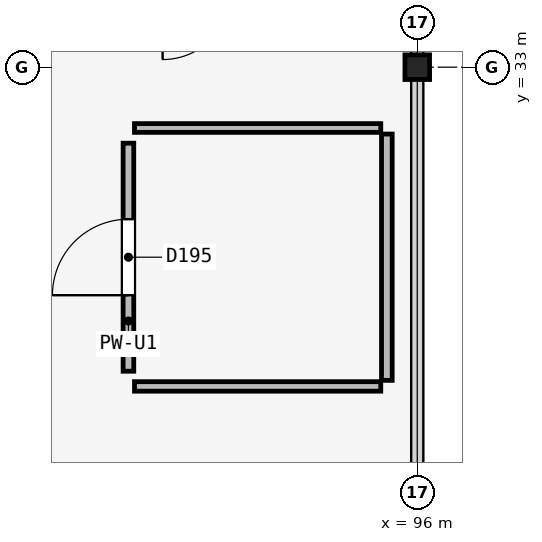
"""IFC4 building model, lengths in metres.
Left out: names, types, materials, properties, quantities, classifications, styles, units other than length and angle.
Written with IfcOpenShell. Run it as: python <this file> out.ifc"""

import sys

from ifc_helpers import new_model, si_unit, direction, frame, frame_2d, origin, origin_2d, place, context, subcontext, project, spatial, rectangle, hollow_circle, extrude, element, fill, save


model = new_model("IFC4")
c1 = context("Model", 3, precision=1e-05, world=origin(), true_north=direction((0.0, 1.0)))
c2 = subcontext(c1, "Body", "Model", "MODEL_VIEW")
j1 = project(units=[si_unit("LENGTHUNIT", "METRE"), si_unit("PLANEANGLEUNIT", "RADIAN")], contexts=[c1])
p1 = place(None, origin())
s1 = spatial("IfcSite", under=j1, at=p1, CompositionType="ELEMENT")
p2 = place(p1, origin())
s2 = spatial("IfcBuilding", under=s1, at=p2, CompositionType="ELEMENT")
p3 = place(p2, frame((0.0, 0.0, 4.8)))
s3 = spatial("IfcBuildingStorey", under=s2, at=p3, CompositionType="ELEMENT", Elevation=4.8)
p4 = place(p3, frame((96.0, 33.0, 0.0), z_axis=(0.0, 0.0, 1.0), x_axis=(1.0, 0.0, 0.0)))
e1 = element("IfcColumn", 1, at=p4, inside=s3, PredefinedType="COLUMN", context=c2, shape_type="SweptSolid", body=[
    extrude(hollow_circle(Radius=0.162, WallThickness=0.013, at=origin_2d()), origin(), (0.0, 0.0, 1.0), 4.5),
])
p5 = place(p3, frame((92.2, 29.0, 0.0), z_axis=(0.0, 0.0, 1.0), x_axis=(0.0, 1.0, 0.0)))
e2 = element("IfcWall", 2, at=p5, inside=s3, PredefinedType="PARTITIONING", context=c2, shape_type="SweptSolid", body=[
    extrude(rectangle(XDim=3.0, YDim=0.14, at=frame_2d((1.5, 0.0))), origin(), (0.0, 0.0, 1.0), 4.19),
])
p6 = place(p5, frame((1.0, 0.0, 0.0)))
e3 = element("IfcOpeningElement", 3, at=p6, cuts=e2, PredefinedType="OPENING", context=c2, shape_type="SweptSolid", body=[
    extrude(rectangle(XDim=1.0, YDim=2.1, at=frame_2d((0.5, 1.05))), frame((0.0, 0.08, 0.0), z_axis=(0.0, -1.0, 0.0), x_axis=(1.0, 0.0, 0.0)), (0.0, 0.0, 1.0), 0.16),
])
p7 = place(p3, frame((95.6, 32.12, 0.0), z_axis=(0.0, 0.0, 1.0), x_axis=(0.0, -1.0, 0.0)))
e4 = element("IfcWall", 4, at=p7, inside=s3, PredefinedType="PARTITIONING", context=c2, shape_type="SweptSolid", body=[
    extrude(rectangle(XDim=3.24, YDim=0.14, at=frame_2d((1.62, 0.0))), origin(), (0.0, 0.0, 1.0), 4.19),
])
p8 = place(p3, frame((95.52, 28.8, 0.0), z_axis=(0.0, 0.0, 1.0), x_axis=(-1.0, 0.0, 0.0)))
e5 = element("IfcWall", 5, at=p8, inside=s3, PredefinedType="PARTITIONING", context=c2, shape_type="SweptSolid", body=[
    extrude(rectangle(XDim=3.24, YDim=0.125, at=frame_2d((1.62, 0.0))), origin(), (0.0, 0.0, 1.0), 4.19),
])
p9 = place(p3, frame((92.28, 32.2, 0.0), z_axis=(0.0, 0.0, 1.0), x_axis=(1.0, 0.0, 0.0)))
e6 = element("IfcWall", 6, at=p9, inside=s3, PredefinedType="PARTITIONING", context=c2, shape_type="SweptSolid", body=[
    extrude(rectangle(XDim=3.24, YDim=0.115, at=frame_2d((1.62, 0.0))), origin(), (0.0, 0.0, 1.0), 4.19),
])
p10 = place(p6, origin())
e7 = element("IfcDoor", 7, at=p10, inside=s3, OperationType="SINGLE_SWING_LEFT", PredefinedType="DOOR", context=c2, shape_type="SweptSolid", body=[
    extrude(rectangle(XDim=1.0, YDim=2.1, at=frame_2d((0.5, 1.05))), frame((0.0, 0.025, 0.0), z_axis=(0.0, -1.0, 0.0), x_axis=(1.0, 0.0, 0.0)), (0.0, 0.0, 1.0), 0.05),
])
fill(e3, e7)
save(model, sys.argv[1])
